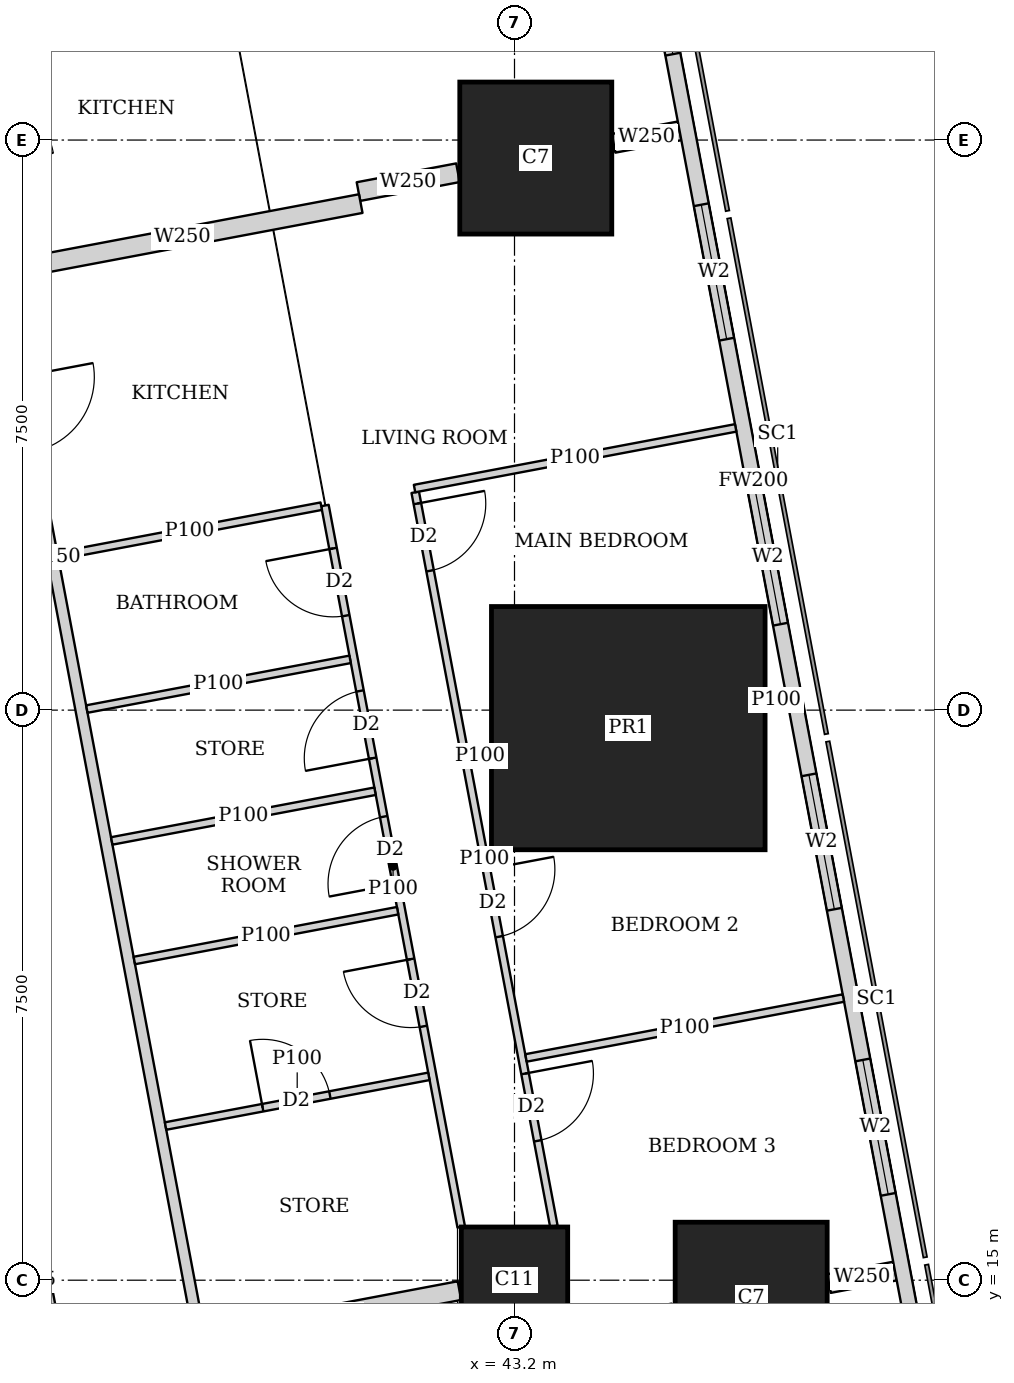
"""IFC4 building model, lengths in metres.
Left out: names, types, materials, properties, quantities, classifications, styles, units other than length and angle.
Written with IfcOpenShell. Run it as: python <this file> out.ifc"""

import sys

from ifc_helpers import new_model, si_unit, direction, frame, frame_2d, origin, origin_2d, place, context, subcontext, project, spatial, rectangle, extrude, element, fill, save


model = new_model("IFC4")
c1 = context("Model", 3, precision=1e-05, world=origin(), true_north=direction((0.0, 1.0)))
c2 = subcontext(c1, "Body", "Model", "MODEL_VIEW")
j1 = project(units=[si_unit("LENGTHUNIT", "METRE"), si_unit("PLANEANGLEUNIT", "RADIAN")], contexts=[c1])
p1 = place(None, origin())
s1 = spatial("IfcSite", under=j1, at=p1, CompositionType="ELEMENT")
p2 = place(p1, origin())
s2 = spatial("IfcBuilding", under=s1, at=p2, CompositionType="ELEMENT")
p3 = place(p2, frame((0.0, 0.0, 281.6)))
s3 = spatial("IfcBuildingStorey", under=s2, at=p3, CompositionType="ELEMENT", Elevation=281.6)
p4 = place(p3, frame((43.2, 15.0, 0.0), z_axis=(0.0, 0.0, 1.0), x_axis=(1.0, 0.0, 0.0)))
e1 = element("IfcColumn", 1, at=p4, inside=s3, PredefinedType="COLUMN", context=c2, shape_type="SweptSolid", body=[
    extrude(rectangle(XDim=1.4, YDim=1.4, at=origin_2d()), origin(), (0.0, 0.0, 1.0), 3.75),
])
p5 = place(p3, frame((46.314, 14.763, 0.0), z_axis=(0.0, 0.0, 1.0), x_axis=(1.0, 0.0, 0.0)))
e2 = element("IfcColumn", 2, at=p5, inside=s3, PredefinedType="COLUMN", context=c2, shape_type="SweptSolid", body=[
    extrude(rectangle(XDim=2.0, YDim=2.0, at=origin_2d()), origin(), (0.0, 0.0, 1.0), 3.75),
])
p6 = place(p3, frame((44.697, 22.263, 0.0), z_axis=(0.0, 0.0, 1.0), x_axis=(1.0, 0.0, 0.0)))
e3 = element("IfcColumn", 3, at=p6, inside=s3, PredefinedType="COLUMN", context=c2, shape_type="SweptSolid", body=[
    extrude(rectangle(XDim=3.6, YDim=3.2, at=origin_2d()), origin(), (0.0, 0.0, 1.0), 3.75),
])
p7 = place(p3, frame((43.48, 29.763, 0.0), z_axis=(0.0, 0.0, 1.0), x_axis=(1.0, 0.0, 0.0)))
e4 = element("IfcColumn", 4, at=p7, inside=s3, PredefinedType="COLUMN", context=c2, shape_type="SweptSolid", body=[
    extrude(rectangle(XDim=2.0, YDim=2.0, at=origin_2d()), origin(), (0.0, 0.0, 1.0), 3.75),
])
p8 = place(p3, frame((49.684, 7.832, 0.0), z_axis=(0.0, 0.0, 1.0), x_axis=(-0.185616669694, 0.982622232565, 0.0)))
e5 = element("IfcWall", 5, at=p8, inside=s3, PredefinedType="SOLIDWALL", context=c2, shape_type="SweptSolid", body=[
    extrude(rectangle(XDim=36.0, YDim=0.2, at=frame_2d((18.0, 0.0))), origin(), (0.0, 0.0, 1.0), 3.5),
])
p9 = place(p8, frame((2.518, 0.0, 0.9)))
e6 = element("IfcOpeningElement", 6, at=p9, cuts=e5, PredefinedType="OPENING", context=c2, shape_type="SweptSolid", body=[
    extrude(rectangle(XDim=2.4, YDim=1.5, at=frame_2d((1.2, 0.75))), frame((0.0, 0.11, 0.0), z_axis=(0.0, -1.0, 0.0), x_axis=(1.0, 0.0, 0.0)), (0.0, 0.0, 1.0), 0.22),
])
p10 = place(p8, frame((8.444, 0.0, 0.9)))
e7 = element("IfcOpeningElement", 7, at=p10, cuts=e5, PredefinedType="OPENING", context=c2, shape_type="SweptSolid", body=[
    extrude(rectangle(XDim=1.8, YDim=1.5, at=frame_2d((0.9, 0.75))), frame((0.0, 0.11, 0.0), z_axis=(0.0, -1.0, 0.0), x_axis=(1.0, 0.0, 0.0)), (0.0, 0.0, 1.0), 0.22),
])
p11 = place(p8, frame((12.261, 0.0, 0.9)))
e8 = element("IfcOpeningElement", 8, at=p11, cuts=e5, PredefinedType="OPENING", context=c2, shape_type="SweptSolid", body=[
    extrude(rectangle(XDim=1.8, YDim=1.5, at=frame_2d((0.9, 0.75))), frame((0.0, 0.11, 0.0), z_axis=(0.0, -1.0, 0.0), x_axis=(1.0, 0.0, 0.0)), (0.0, 0.0, 1.0), 0.22),
])
p12 = place(p8, frame((16.078, 0.0, 0.9)))
e9 = element("IfcOpeningElement", 9, at=p12, cuts=e5, PredefinedType="OPENING", context=c2, shape_type="SweptSolid", body=[
    extrude(rectangle(XDim=1.8, YDim=1.5, at=frame_2d((0.9, 0.75))), frame((0.0, 0.11, 0.0), z_axis=(0.0, -1.0, 0.0), x_axis=(1.0, 0.0, 0.0)), (0.0, 0.0, 1.0), 0.22),
])
p13 = place(p8, frame((19.894, 0.0, 0.9)))
e10 = element("IfcOpeningElement", 10, at=p13, cuts=e5, PredefinedType="OPENING", context=c2, shape_type="SweptSolid", body=[
    extrude(rectangle(XDim=1.8, YDim=1.5, at=frame_2d((0.9, 0.75))), frame((0.0, 0.11, 0.0), z_axis=(0.0, -1.0, 0.0), x_axis=(1.0, 0.0, 0.0)), (0.0, 0.0, 1.0), 0.22),
])
p14 = place(p8, frame((23.71, 0.0, 0.9)))
e11 = element("IfcOpeningElement", 11, at=p14, cuts=e5, PredefinedType="OPENING", context=c2, shape_type="SweptSolid", body=[
    extrude(rectangle(XDim=1.8, YDim=1.5, at=frame_2d((0.9, 0.75))), frame((0.0, 0.11, 0.0), z_axis=(0.0, -1.0, 0.0), x_axis=(1.0, 0.0, 0.0)), (0.0, 0.0, 1.0), 0.22),
])
p15 = place(p8, frame((27.526, 0.0, 0.9)))
e12 = element("IfcOpeningElement", 12, at=p15, cuts=e5, PredefinedType="OPENING", context=c2, shape_type="SweptSolid", body=[
    extrude(rectangle(XDim=1.8, YDim=1.5, at=frame_2d((0.9, 0.75))), frame((0.0, 0.11, 0.0), z_axis=(0.0, -1.0, 0.0), x_axis=(1.0, 0.0, 0.0)), (0.0, 0.0, 1.0), 0.22),
])
p16 = place(p8, frame((32.046, 0.0, 0.9)))
e13 = element("IfcOpeningElement", 13, at=p16, cuts=e5, PredefinedType="OPENING", context=c2, shape_type="SweptSolid", body=[
    extrude(rectangle(XDim=1.8, YDim=1.5, at=frame_2d((0.9, 0.75))), frame((0.0, 0.11, 0.0), z_axis=(0.0, -1.0, 0.0), x_axis=(1.0, 0.0, 0.0)), (0.0, 0.0, 1.0), 0.22),
])
p17 = place(p3, frame((33.781, 42.186, 0.0), z_axis=(0.0, 0.0, 1.0), x_axis=(0.185593518645, -0.9826266055, 0.0)))
e14 = element("IfcWall", 14, at=p17, inside=s3, PredefinedType="SOLIDWALL", context=c2, shape_type="SweptSolid", body=[
    extrude(rectangle(XDim=35.961, YDim=0.15, at=frame_2d((17.98, 0.0))), origin(), (0.0, 0.0, 1.0), 2.5),
])
p18 = place(p17, frame((11.76, 0.0, 0.0)))
e15 = element("IfcOpeningElement", 15, at=p18, cuts=e14, PredefinedType="OPENING", context=c2, shape_type="SweptSolid", body=[
    extrude(rectangle(XDim=1.0, YDim=2.1, at=frame_2d((0.5, 1.05))), frame((0.0, 0.085, 0.0), z_axis=(0.0, -1.0, 0.0), x_axis=(1.0, 0.0, 0.0)), (0.0, 0.0, 1.0), 0.17),
])
p19 = place(p17, frame((15.576, 0.0, 0.0)))
e16 = element("IfcOpeningElement", 16, at=p19, cuts=e14, PredefinedType="OPENING", context=c2, shape_type="SweptSolid", body=[
    extrude(rectangle(XDim=1.0, YDim=2.1, at=frame_2d((0.5, 1.05))), frame((0.0, 0.085, 0.0), z_axis=(0.0, -1.0, 0.0), x_axis=(1.0, 0.0, 0.0)), (0.0, 0.0, 1.0), 0.17),
])
p20 = place(p17, frame((30.502, 0.0, 0.0)))
e17 = element("IfcOpeningElement", 17, at=p20, cuts=e14, PredefinedType="OPENING", context=c2, shape_type="SweptSolid", body=[
    extrude(rectangle(XDim=1.0, YDim=2.1, at=frame_2d((0.5, 1.05))), frame((0.0, 0.085, 0.0), z_axis=(0.0, -1.0, 0.0), x_axis=(1.0, 0.0, 0.0)), (0.0, 0.0, 1.0), 0.17),
])
p21 = place(p3, frame((41.894, 25.366, 0.0), z_axis=(0.0, 0.0, 1.0), x_axis=(0.185612905165, -0.982622943675, 0.0)))
e18 = element("IfcWall", 18, at=p21, inside=s3, PredefinedType="PARTITIONING", context=c2, shape_type="SweptSolid", body=[
    extrude(rectangle(XDim=9.827, YDim=0.1, at=frame_2d((4.913, 0.0))), origin(), (0.0, 0.0, 1.0), 2.5),
])
p22 = place(p21, frame((0.151, 0.0, 0.0)))
e19 = element("IfcOpeningElement", 19, at=p22, cuts=e18, PredefinedType="OPENING", context=c2, shape_type="SweptSolid", body=[
    extrude(rectangle(XDim=0.9, YDim=2.1, at=frame_2d((0.45, 1.05))), frame((0.0, 0.06, 0.0), z_axis=(0.0, -1.0, 0.0), x_axis=(1.0, 0.0, 0.0)), (0.0, 0.0, 1.0), 0.12),
])
p23 = place(p21, frame((5.05, 0.0, 0.0)))
e20 = element("IfcOpeningElement", 20, at=p23, cuts=e18, PredefinedType="OPENING", context=c2, shape_type="SweptSolid", body=[
    extrude(rectangle(XDim=0.9, YDim=2.1, at=frame_2d((0.45, 1.05))), frame((0.0, 0.06, 0.0), z_axis=(0.0, -1.0, 0.0), x_axis=(1.0, 0.0, 0.0)), (0.0, 0.0, 1.0), 0.12),
])
p24 = place(p21, frame((7.783, 0.0, 0.0)))
e21 = element("IfcOpeningElement", 21, at=p24, cuts=e18, PredefinedType="OPENING", context=c2, shape_type="SweptSolid", body=[
    extrude(rectangle(XDim=0.9, YDim=2.1, at=frame_2d((0.45, 1.05))), frame((0.0, 0.06, 0.0), z_axis=(0.0, -1.0, 0.0), x_axis=(1.0, 0.0, 0.0)), (0.0, 0.0, 1.0), 0.12),
])
p25 = place(p3, frame((40.706, 25.192, 0.0), z_axis=(0.0, 0.0, 1.0), x_axis=(0.185629824463, -0.982619747547, 0.0)))
e22 = element("IfcWall", 22, at=p25, inside=s3, PredefinedType="PARTITIONING", context=c2, shape_type="SweptSolid", body=[
    extrude(rectangle(XDim=9.659, YDim=0.1, at=frame_2d((4.83, 0.0))), origin(), (0.0, 0.0, 1.0), 2.5),
])
p26 = place(p25, frame((0.575, 0.0, 0.0)))
e23 = element("IfcOpeningElement", 23, at=p26, cuts=e22, PredefinedType="OPENING", context=c2, shape_type="SweptSolid", body=[
    extrude(rectangle(XDim=0.9, YDim=2.1, at=frame_2d((0.45, 1.05))), frame((0.0, 0.06, 0.0), z_axis=(0.0, -1.0, 0.0), x_axis=(1.0, 0.0, 0.0)), (0.0, 0.0, 1.0), 0.12),
])
p27 = place(p25, frame((4.166, 0.0, 0.0)))
e24 = element("IfcOpeningElement", 24, at=p27, cuts=e22, PredefinedType="OPENING", context=c2, shape_type="SweptSolid", body=[
    extrude(rectangle(XDim=0.9, YDim=2.1, at=frame_2d((0.45, 1.05))), frame((0.0, 0.06, 0.0), z_axis=(0.0, -1.0, 0.0), x_axis=(1.0, 0.0, 0.0)), (0.0, 0.0, 1.0), 0.12),
])
p28 = place(p25, frame((2.483, 0.0, 0.0)))
e25 = element("IfcOpeningElement", 25, at=p28, cuts=e22, PredefinedType="OPENING", context=c2, shape_type="SweptSolid", body=[
    extrude(rectangle(XDim=0.9, YDim=2.1, at=frame_2d((0.45, 1.05))), frame((0.0, 0.06, 0.0), z_axis=(0.0, -1.0, 0.0), x_axis=(1.0, 0.0, 0.0)), (0.0, 0.0, 1.0), 0.12),
])
p29 = place(p25, frame((6.074, 0.0, 0.0)))
e26 = element("IfcOpeningElement", 26, at=p29, cuts=e22, PredefinedType="OPENING", context=c2, shape_type="SweptSolid", body=[
    extrude(rectangle(XDim=0.9, YDim=2.1, at=frame_2d((0.45, 1.05))), frame((0.0, 0.06, 0.0), z_axis=(0.0, -1.0, 0.0), x_axis=(1.0, 0.0, 0.0)), (0.0, 0.0, 1.0), 0.12),
])
p30 = place(p3, frame((46.11, 26.213, 0.0), z_axis=(0.0, 0.0, 1.0), x_axis=(-0.982633535512, -0.185556823879, 0.0)))
e27 = element("IfcWall", 27, at=p30, inside=s3, PredefinedType="PARTITIONING", context=c2, shape_type="SweptSolid", body=[
    extrude(rectangle(XDim=4.3, YDim=0.1, at=frame_2d((2.15, 0.0))), origin(), (0.0, 0.0, 1.0), 2.5),
])
p31 = place(p3, frame((46.782, 22.657, 0.0), z_axis=(0.0, 0.0, 1.0), x_axis=(-0.982574553168, -0.185868898601, 0.0)))
e28 = element("IfcWall", 28, at=p31, inside=s3, PredefinedType="PARTITIONING", context=c2, shape_type="SweptSolid", body=[
    extrude(rectangle(XDim=0.28, YDim=0.1, at=frame_2d((0.14, 0.0))), origin(), (0.0, 0.0, 1.0), 3.5),
])
p32 = place(p3, frame((42.887, 21.921, 0.0), z_axis=(0.0, 0.0, 1.0), x_axis=(-0.982688058078, -0.185267861514, 0.0)))
e29 = element("IfcWall", 29, at=p32, inside=s3, PredefinedType="PARTITIONING", context=c2, shape_type="SweptSolid", body=[
    extrude(rectangle(XDim=0.286, YDim=0.1, at=frame_2d((0.143, 0.0))), origin(), (0.0, 0.0, 1.0), 2.5),
])
p33 = place(p3, frame((47.527, 18.712, 0.0), z_axis=(0.0, 0.0, 1.0), x_axis=(-0.982665405803, -0.185387972203, 0.0)))
e30 = element("IfcWall", 30, at=p33, inside=s3, PredefinedType="PARTITIONING", context=c2, shape_type="SweptSolid", body=[
    extrude(rectangle(XDim=4.25, YDim=0.1, at=frame_2d((2.125, 0.0))), origin(), (0.0, 0.0, 1.0), 2.5),
])
p34 = place(p3, frame((40.657, 25.183, 0.0), z_axis=(0.0, 0.0, 1.0), x_axis=(-0.982585626838, -0.185810349366, 0.0)))
e31 = element("IfcWall", 31, at=p34, inside=s3, PredefinedType="PARTITIONING", context=c2, shape_type="SweptSolid", body=[
    extrude(rectangle(XDim=3.525, YDim=0.1, at=frame_2d((1.763, 0.0))), origin(), (0.0, 0.0, 1.0), 3.5),
])
p35 = place(p3, frame((41.365, 21.433, 0.0), z_axis=(0.0, 0.0, 1.0), x_axis=(-0.982638553676, -0.185530247748, 0.0)))
e32 = element("IfcWall", 32, at=p35, inside=s3, PredefinedType="PARTITIONING", context=c2, shape_type="SweptSolid", body=[
    extrude(rectangle(XDim=3.525, YDim=0.1, at=frame_2d((1.763, 0.0))), origin(), (0.0, 0.0, 1.0), 3.5),
])
p36 = place(p3, frame((42.073, 17.682, 0.0), z_axis=(0.0, 0.0, 1.0), x_axis=(-0.98265117712, -0.185463376723, 0.0)))
e33 = element("IfcWall", 33, at=p36, inside=s3, PredefinedType="PARTITIONING", context=c2, shape_type="SweptSolid", body=[
    extrude(rectangle(XDim=3.525, YDim=0.1, at=frame_2d((1.763, 0.0))), origin(), (0.0, 0.0, 1.0), 3.5),
])
p37 = place(p36, frame((1.325, 0.0, 0.0)))
e34 = element("IfcOpeningElement", 34, at=p37, cuts=e33, PredefinedType="OPENING", context=c2, shape_type="SweptSolid", body=[
    extrude(rectangle(XDim=0.9, YDim=2.1, at=frame_2d((0.45, 1.05))), frame((0.0, 0.06, 0.0), z_axis=(0.0, -1.0, 0.0), x_axis=(1.0, 0.0, 0.0)), (0.0, 0.0, 1.0), 0.12),
])
p38 = place(p3, frame((41.037, 23.168, 0.0), z_axis=(0.0, 0.0, 1.0), x_axis=(-0.982638553676, -0.185530247748, 0.0)))
e35 = element("IfcWall", 35, at=p38, inside=s3, PredefinedType="PARTITIONING", context=c2, shape_type="SweptSolid", body=[
    extrude(rectangle(XDim=3.525, YDim=0.1, at=frame_2d((1.763, 0.0))), origin(), (0.0, 0.0, 1.0), 2.5),
])
p39 = place(p3, frame((41.662, 19.861, 0.0), z_axis=(0.0, 0.0, 1.0), x_axis=(-0.982588017646, -0.185797706064, 0.0)))
e36 = element("IfcWall", 36, at=p39, inside=s3, PredefinedType="PARTITIONING", context=c2, shape_type="SweptSolid", body=[
    extrude(rectangle(XDim=3.525, YDim=0.1, at=frame_2d((1.763, 0.0))), origin(), (0.0, 0.0, 1.0), 3.5),
])
p40 = place(p3, frame((45.372, 30.121, 0.0), z_axis=(0.0, 0.0, 1.0), x_axis=(-0.982608419258, -0.185689780017, 0.0)))
e37 = element("IfcWall", 37, at=p40, inside=s3, PredefinedType="SOLIDWALL", context=c2, shape_type="SweptSolid", body=[
    extrude(rectangle(XDim=0.884, YDim=0.25, at=frame_2d((0.442, 0.0))), origin(), (0.0, 0.0, 1.0), 3.5),
])
p41 = place(p3, frame((42.456, 29.57, 0.0), z_axis=(0.0, 0.0, 1.0), x_axis=(-0.982517742323, -0.18616897169, 0.0)))
e38 = element("IfcWall", 38, at=p41, inside=s3, PredefinedType="SOLIDWALL", context=c2, shape_type="SweptSolid", body=[
    extrude(rectangle(XDim=1.332, YDim=0.25, at=frame_2d((0.666, 0.0))), origin(), (0.0, 0.0, 1.0), 2.5),
])
p42 = place(p3, frame((41.177, 29.164, 0.0), z_axis=(0.0, 0.0, 1.0), x_axis=(-0.982642846239, -0.185507511263, 0.0)))
e39 = element("IfcWall", 39, at=p42, inside=s3, PredefinedType="SOLIDWALL", context=c2, shape_type="SweptSolid", body=[
    extrude(rectangle(XDim=4.776, YDim=0.25, at=frame_2d((2.388, 0.0))), origin(), (0.0, 0.0, 1.0), 2.5),
])
p43 = place(p3, frame((48.206, 15.12, 0.0), z_axis=(0.0, 0.0, 1.0), x_axis=(-0.982608419258, -0.185689780017, 0.0)))
e40 = element("IfcWall", 40, at=p43, inside=s3, PredefinedType="SOLIDWALL", context=c2, shape_type="SweptSolid", body=[
    extrude(rectangle(XDim=0.884, YDim=0.25, at=frame_2d((0.442, 0.0))), origin(), (0.0, 0.0, 1.0), 3.5),
])
p44 = place(p3, frame((42.476, 14.863, 0.0), z_axis=(0.0, 0.0, 1.0), x_axis=(-0.982603567712, -0.185715450942, 0.0)))
e41 = element("IfcWall", 41, at=p44, inside=s3, PredefinedType="SOLIDWALL", context=c2, shape_type="SweptSolid", body=[
    extrude(rectangle(XDim=3.398, YDim=0.25, at=frame_2d((1.699, 0.0))), origin(), (0.0, 0.0, 1.0), 3.5),
])
p45 = place(p3, frame((37.947, 10.163, 0.0), z_axis=(0.0, 0.0, 1.0), x_axis=(-0.185572770922, 0.982630523998, 0.0)))
e42 = element("IfcWall", 42, at=p45, inside=s3, PredefinedType="PARTITIONING", context=c2, shape_type="SweptSolid", body=[
    extrude(rectangle(XDim=25.111, YDim=0.125, at=frame_2d((12.556, 0.0))), origin(), (0.0, 0.0, 1.0), 2.5),
])
p46 = place(p45, frame((0.708, 0.0, 0.0)))
e43 = element("IfcOpeningElement", 43, at=p46, cuts=e42, PredefinedType="OPENING", context=c2, shape_type="SweptSolid", body=[
    extrude(rectangle(XDim=1.0, YDim=2.1, at=frame_2d((0.5, 1.05))), frame((0.0, 0.073, 0.0), z_axis=(0.0, -1.0, 0.0), x_axis=(1.0, 0.0, 0.0)), (0.0, 0.0, 1.0), 0.145),
])
p47 = place(p45, frame((5.9, 0.0, 0.0)))
e44 = element("IfcOpeningElement", 44, at=p47, cuts=e42, PredefinedType="OPENING", context=c2, shape_type="SweptSolid", body=[
    extrude(rectangle(XDim=1.0, YDim=2.1, at=frame_2d((0.5, 1.05))), frame((0.0, 0.073, 0.0), z_axis=(0.0, -1.0, 0.0), x_axis=(1.0, 0.0, 0.0)), (0.0, 0.0, 1.0), 0.145),
])
p48 = place(p45, frame((13.378, 0.0, 0.0)))
e45 = element("IfcOpeningElement", 45, at=p48, cuts=e42, PredefinedType="OPENING", context=c2, shape_type="SweptSolid", body=[
    extrude(rectangle(XDim=1.0, YDim=2.1, at=frame_2d((0.5, 1.05))), frame((0.0, 0.073, 0.0), z_axis=(0.0, -1.0, 0.0), x_axis=(1.0, 0.0, 0.0)), (0.0, 0.0, 1.0), 0.145),
])
p49 = place(p45, frame((21.15, 0.0, 0.0)))
e46 = element("IfcOpeningElement", 46, at=p49, cuts=e42, PredefinedType="OPENING", context=c2, shape_type="SweptSolid", body=[
    extrude(rectangle(XDim=1.0, YDim=2.1, at=frame_2d((0.5, 1.05))), frame((0.0, 0.073, 0.0), z_axis=(0.0, -1.0, 0.0), x_axis=(1.0, 0.0, 0.0)), (0.0, 0.0, 1.0), 0.145),
])
p50 = place(p10, origin())
e47 = element("IfcWindow", 47, at=p50, inside=s3, PartitioningType="SINGLE_PANEL", PredefinedType="WINDOW", context=c2, shape_type="SweptSolid", body=[
    extrude(rectangle(XDim=1.8, YDim=1.5, at=frame_2d((0.9, 0.75))), frame((0.0, 0.03, 0.0), z_axis=(0.0, -1.0, 0.0), x_axis=(1.0, 0.0, 0.0)), (0.0, 0.0, 1.0), 0.06),
])
fill(e7, e47)
p51 = place(p11, origin())
e48 = element("IfcWindow", 48, at=p51, inside=s3, PartitioningType="SINGLE_PANEL", PredefinedType="WINDOW", context=c2, shape_type="SweptSolid", body=[
    extrude(rectangle(XDim=1.8, YDim=1.5, at=frame_2d((0.9, 0.75))), frame((0.0, 0.03, 0.0), z_axis=(0.0, -1.0, 0.0), x_axis=(1.0, 0.0, 0.0)), (0.0, 0.0, 1.0), 0.06),
])
fill(e8, e48)
p52 = place(p12, origin())
e49 = element("IfcWindow", 49, at=p52, inside=s3, PartitioningType="SINGLE_PANEL", PredefinedType="WINDOW", context=c2, shape_type="SweptSolid", body=[
    extrude(rectangle(XDim=1.8, YDim=1.5, at=frame_2d((0.9, 0.75))), frame((0.0, 0.03, 0.0), z_axis=(0.0, -1.0, 0.0), x_axis=(1.0, 0.0, 0.0)), (0.0, 0.0, 1.0), 0.06),
])
fill(e9, e49)
p53 = place(p13, origin())
e50 = element("IfcWindow", 50, at=p53, inside=s3, PartitioningType="SINGLE_PANEL", PredefinedType="WINDOW", context=c2, shape_type="SweptSolid", body=[
    extrude(rectangle(XDim=1.8, YDim=1.5, at=frame_2d((0.9, 0.75))), frame((0.0, 0.03, 0.0), z_axis=(0.0, -1.0, 0.0), x_axis=(1.0, 0.0, 0.0)), (0.0, 0.0, 1.0), 0.06),
])
fill(e10, e50)
p54 = place(p14, origin())
e51 = element("IfcWindow", 51, at=p54, inside=s3, PartitioningType="SINGLE_PANEL", PredefinedType="WINDOW", context=c2, shape_type="SweptSolid", body=[
    extrude(rectangle(XDim=1.8, YDim=1.5, at=frame_2d((0.9, 0.75))), frame((0.0, 0.03, 0.0), z_axis=(0.0, -1.0, 0.0), x_axis=(1.0, 0.0, 0.0)), (0.0, 0.0, 1.0), 0.06),
])
fill(e11, e51)
p55 = place(p22, origin())
e52 = element("IfcDoor", 52, at=p55, inside=s3, OperationType="SINGLE_SWING_LEFT", PredefinedType="DOOR", context=c2, shape_type="SweptSolid", body=[
    extrude(rectangle(XDim=0.9, YDim=2.1, at=frame_2d((0.45, 1.05))), frame((0.0, 0.025, 0.0), z_axis=(0.0, -1.0, 0.0), x_axis=(1.0, 0.0, 0.0)), (0.0, 0.0, 1.0), 0.05),
])
fill(e19, e52)
p56 = place(p23, origin())
e53 = element("IfcDoor", 53, at=p56, inside=s3, OperationType="SINGLE_SWING_LEFT", PredefinedType="DOOR", context=c2, shape_type="SweptSolid", body=[
    extrude(rectangle(XDim=0.9, YDim=2.1, at=frame_2d((0.45, 1.05))), frame((0.0, 0.025, 0.0), z_axis=(0.0, -1.0, 0.0), x_axis=(1.0, 0.0, 0.0)), (0.0, 0.0, 1.0), 0.05),
])
fill(e20, e53)
p57 = place(p24, origin())
e54 = element("IfcDoor", 54, at=p57, inside=s3, OperationType="SINGLE_SWING_LEFT", PredefinedType="DOOR", context=c2, shape_type="SweptSolid", body=[
    extrude(rectangle(XDim=0.9, YDim=2.1, at=frame_2d((0.45, 1.05))), frame((0.0, 0.025, 0.0), z_axis=(0.0, -1.0, 0.0), x_axis=(1.0, 0.0, 0.0)), (0.0, 0.0, 1.0), 0.05),
])
fill(e21, e54)
p58 = place(p26, origin())
e55 = element("IfcDoor", 55, at=p58, inside=s3, OperationType="SINGLE_SWING_RIGHT", PredefinedType="DOOR", context=c2, shape_type="SweptSolid", body=[
    extrude(rectangle(XDim=0.9, YDim=2.1, at=frame_2d((0.45, 1.05))), frame((0.0, 0.025, 0.0), z_axis=(0.0, -1.0, 0.0), x_axis=(1.0, 0.0, 0.0)), (0.0, 0.0, 1.0), 0.05),
])
fill(e23, e55)
p59 = place(p27, origin())
e56 = element("IfcDoor", 56, at=p59, inside=s3, OperationType="SINGLE_SWING_LEFT", PredefinedType="DOOR", context=c2, shape_type="SweptSolid", body=[
    extrude(rectangle(XDim=0.9, YDim=2.1, at=frame_2d((0.45, 1.05))), frame((0.0, 0.025, 0.0), z_axis=(0.0, -1.0, 0.0), x_axis=(1.0, 0.0, 0.0)), (0.0, 0.0, 1.0), 0.05),
])
fill(e24, e56)
p60 = place(p28, origin())
e57 = element("IfcDoor", 57, at=p60, inside=s3, OperationType="SINGLE_SWING_LEFT", PredefinedType="DOOR", context=c2, shape_type="SweptSolid", body=[
    extrude(rectangle(XDim=0.9, YDim=2.1, at=frame_2d((0.45, 1.05))), frame((0.0, 0.025, 0.0), z_axis=(0.0, -1.0, 0.0), x_axis=(1.0, 0.0, 0.0)), (0.0, 0.0, 1.0), 0.05),
])
fill(e25, e57)
p61 = place(p29, origin())
e58 = element("IfcDoor", 58, at=p61, inside=s3, OperationType="SINGLE_SWING_RIGHT", PredefinedType="DOOR", context=c2, shape_type="SweptSolid", body=[
    extrude(rectangle(XDim=0.9, YDim=2.1, at=frame_2d((0.45, 1.05))), frame((0.0, 0.025, 0.0), z_axis=(0.0, -1.0, 0.0), x_axis=(1.0, 0.0, 0.0)), (0.0, 0.0, 1.0), 0.05),
])
fill(e26, e58)
p62 = place(p37, origin())
e59 = element("IfcDoor", 59, at=p62, inside=s3, OperationType="SINGLE_SWING_LEFT", PredefinedType="DOOR", context=c2, shape_type="SweptSolid", body=[
    extrude(rectangle(XDim=0.9, YDim=2.1, at=frame_2d((0.45, 1.05))), frame((0.0, 0.025, 0.0), z_axis=(0.0, -1.0, 0.0), x_axis=(1.0, 0.0, 0.0)), (0.0, 0.0, 1.0), 0.05),
])
fill(e34, e59)
save(model, sys.argv[1])
